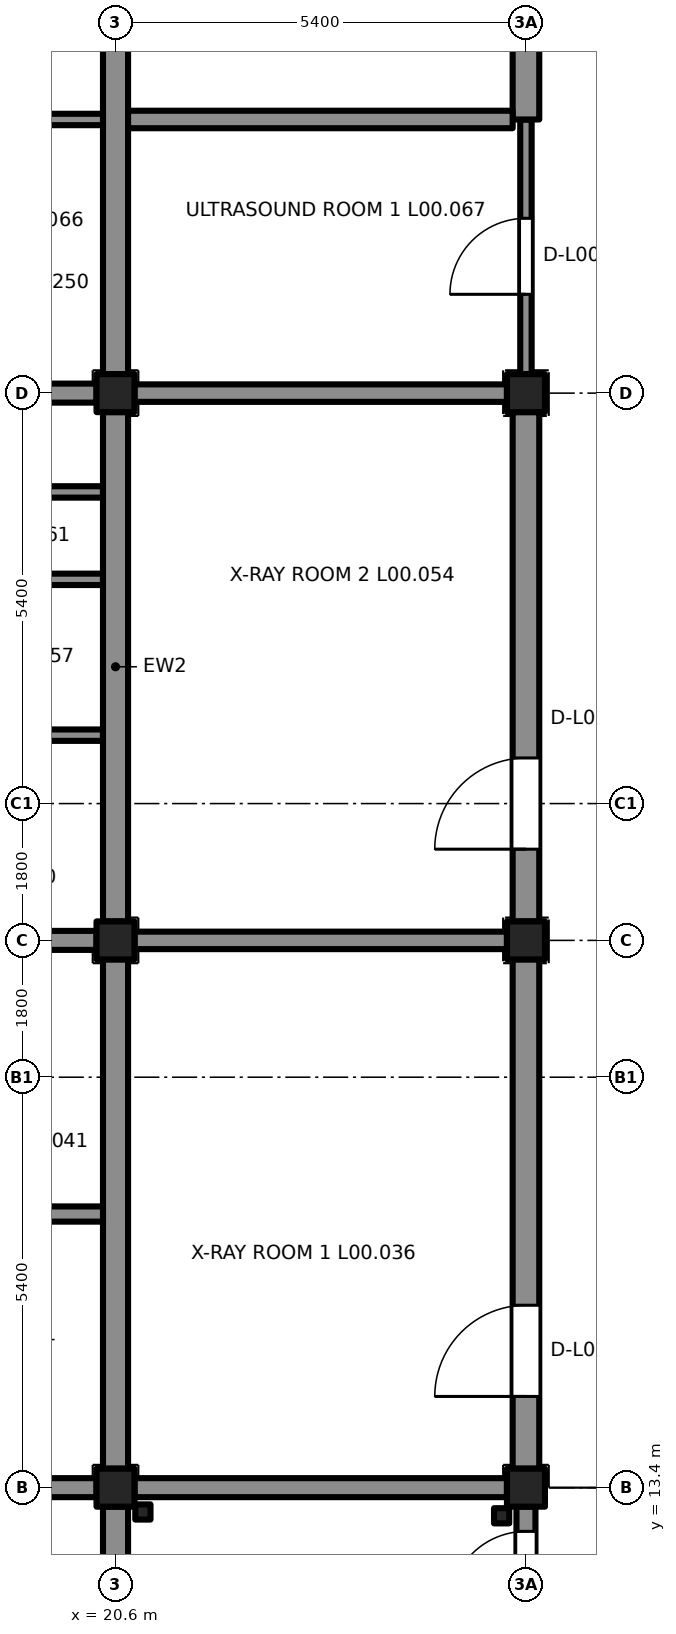
"""IFC4 building model, lengths in metres.
Left out: names, types, materials, properties, quantities, classifications, styles, units other than length and angle.
Written with IfcOpenShell. Run it as: python <this file> out.ifc"""

import sys

from ifc_helpers import new_model, si_unit, direction, frame, frame_2d, origin, origin_2d, place, context, subcontext, project, spatial, rectangle, extrude, element, fill, save


model = new_model("IFC4")
c1 = context("Model", 3, precision=1e-05, world=origin(), true_north=direction((0.0, 1.0)))
c2 = subcontext(c1, "Body", "Model", "MODEL_VIEW")
j1 = project(units=[si_unit("LENGTHUNIT", "METRE"), si_unit("PLANEANGLEUNIT", "RADIAN")], contexts=[c1])
p1 = place(None, origin())
s1 = spatial("IfcSite", under=j1, at=p1, CompositionType="ELEMENT")
p2 = place(p1, origin())
s2 = spatial("IfcBuilding", under=s1, at=p2, CompositionType="ELEMENT")
p3 = place(p2, origin())
s3 = spatial("IfcBuildingStorey", under=s2, at=p3, CompositionType="ELEMENT", Elevation=0.0)
for number, where, z_axis, x_axis in (
    (1, (20.6, 13.4, -0.2), (0.0, 0.0, 1.0), (1.0, 0.0, 0.0)),
    (2, (20.6, 20.6, -0.2), (0.0, 0.0, 1.0), (1.0, 0.0, 0.0)),
    (3, (20.6, 27.8, -0.2), (0.0, 0.0, 1.0), (1.0, 0.0, 0.0)),
    (4, (26.0, 13.4, -0.2), (0.0, 0.0, 1.0), (1.0, 0.0, 0.0)),
    (5, (26.0, 20.6, -0.2), (0.0, 0.0, 1.0), (1.0, 0.0, 0.0)),
    (6, (26.0, 27.8, -0.2), (0.0, 0.0, 1.0), (1.0, 0.0, 0.0)),
):
    element("IfcColumn", number, at=place(p3, frame(where, z_axis=z_axis, x_axis=x_axis)), inside=s3, PredefinedType="COLUMN", context=c2, shape_type="SweptSolid", body=[
        extrude(rectangle(XDim=0.5, YDim=0.5, at=origin_2d()), origin(), (0.0, 0.0, 1.0), 5.45),
    ])
for number, where, z_axis, x_axis in (
    (7, (15.45, 13.4, 0.0), (0.0, 0.0, 1.0), (1.0, 0.0, 0.0)),
    (8, (15.45, 20.6, 0.0), (0.0, 0.0, 1.0), (1.0, 0.0, 0.0)),
    (9, (15.45, 27.8, 0.0), (0.0, 0.0, 1.0), (1.0, 0.0, 0.0)),
):
    element("IfcWall", number, at=place(p3, frame(where, z_axis=z_axis, x_axis=x_axis)), inside=s3, PredefinedType="SHEAR", context=c2, shape_type="SweptSolid", body=[
        extrude(rectangle(XDim=4.9, YDim=0.25, at=frame_2d((2.45, 0.0))), origin(), (0.0, 0.0, 1.0), 6.05),
    ])
for number, where, z_axis, x_axis in (
    (10, (15.325, 23.3, 0.0), (0.0, 0.0, 1.0), (1.0, 0.0, 0.0)),
    (11, (15.325, 25.35, 0.0), (0.0, 0.0, 1.0), (1.0, 0.0, 0.0)),
    (12, (15.325, 26.5, 0.0), (0.0, 0.0, 1.0), (1.0, 0.0, 0.0)),
):
    element("IfcWall", number, at=place(p3, frame(where, z_axis=z_axis, x_axis=x_axis)), inside=s3, PredefinedType="PARTITIONING", context=c2, shape_type="SweptSolid", body=[
        extrude(rectangle(XDim=5.11, YDim=0.15, at=frame_2d((2.555, 0.0))), origin(), (0.0, 0.0, 1.0), 6.05),
    ])
p4 = place(p3, frame((26.0, 6.365, 0.0), z_axis=(0.0, 0.0, 1.0), x_axis=(0.0, 1.0, 0.0)))
e13 = element("IfcWall", 13, at=p4, inside=s3, PredefinedType="SHEAR", context=c2, shape_type="SweptSolid", body=[
    extrude(rectangle(XDim=6.785, YDim=0.25, at=frame_2d((3.393, 0.0))), origin(), (0.0, 0.0, 1.0), 6.05),
])
p5 = place(p4, frame((5.46, 0.0, 0.0)))
e14 = element("IfcOpeningElement", 14, at=p5, cuts=e13, PredefinedType="OPENING", context=c2, shape_type="SweptSolid", body=[
    extrude(rectangle(XDim=1.0, YDim=2.1, at=frame_2d((0.5, 1.05))), frame((0.0, 0.135, 0.0), z_axis=(0.0, -1.0, 0.0), x_axis=(1.0, 0.0, 0.0)), (0.0, 0.0, 1.0), 0.27),
])
p6 = place(p3, frame((20.85, 13.4, 0.0), z_axis=(0.0, 0.0, 1.0), x_axis=(1.0, 0.0, 0.0)))
e15 = element("IfcWall", 15, at=p6, inside=s3, PredefinedType="SHEAR", context=c2, shape_type="SweptSolid", body=[
    extrude(rectangle(XDim=4.9, YDim=0.25, at=frame_2d((2.45, 0.0))), origin(), (0.0, 0.0, 1.0), 6.05),
])
for number, where, z_axis, x_axis in (
    (16, (20.96, 13.08, 0.0), (0.0, 0.0, 1.0), (1.0, 0.0, 0.0)),
    (17, (25.68, 13.03, 0.0), (0.0, 0.0, 1.0), (1.0, 0.0, 0.0)),
):
    element("IfcColumn", number, at=place(p3, frame(where, z_axis=z_axis, x_axis=x_axis)), inside=s3, PredefinedType="COLUMN", context=c2, shape_type="SweptSolid", body=[
        extrude(rectangle(XDim=0.2, YDim=0.2, at=origin_2d()), origin(), (0.0, 0.0, 1.0), 2.95),
    ])
p7 = place(p3, frame((20.6, 13.15, 0.0), z_axis=(0.0, 0.0, 1.0), x_axis=(0.0, -1.0, 0.0)))
e18 = element("IfcWall", 18, at=p7, inside=s3, PredefinedType="SOLIDWALL", context=c2, shape_type="SweptSolid", body=[
    extrude(rectangle(XDim=7.115, YDim=0.33, at=frame_2d((3.558, 0.0))), origin(), (0.0, 0.0, 1.0), 5.25),
])
p8 = place(p3, frame((20.6, 20.35, 0.0), z_axis=(0.0, 0.0, 1.0), x_axis=(0.0, -1.0, 0.0)))
e19 = element("IfcWall", 19, at=p8, inside=s3, PredefinedType="SOLIDWALL", context=c2, shape_type="SweptSolid", body=[
    extrude(rectangle(XDim=6.7, YDim=0.33, at=frame_2d((3.35, 0.0))), origin(), (0.0, 0.0, 1.0), 5.25),
])
for number, where, z_axis, x_axis in (
    (20, (20.6, 27.55, 0.0), (0.0, 0.0, 1.0), (0.0, -1.0, 0.0)),
    (21, (20.6, 34.75, 0.0), (0.0, 0.0, 1.0), (0.0, -1.0, 0.0)),
):
    element("IfcWall", number, at=place(p3, frame(where, z_axis=z_axis, x_axis=x_axis)), inside=s3, PredefinedType="SOLIDWALL", context=c2, shape_type="SweptSolid", body=[
        extrude(rectangle(XDim=6.7, YDim=0.33, at=frame_2d((3.35, 0.0))), origin(), (0.0, 0.0, 1.0), 5.25),
    ])
p9 = place(p3, frame((20.435, 17.0, 0.0), z_axis=(0.0, 0.0, 1.0), x_axis=(-1.0, 0.0, 0.0)))
e22 = element("IfcWall", 22, at=p9, inside=s3, PredefinedType="PARTITIONING", context=c2, shape_type="SweptSolid", body=[
    extrude(rectangle(XDim=5.16, YDim=0.2, at=frame_2d((2.58, 0.0))), origin(), (0.0, 0.0, 1.0), 6.05),
])
p10 = place(p3, frame((20.435, 31.4, 0.0), z_axis=(0.0, 0.0, 1.0), x_axis=(-1.0, 0.0, 0.0)))
e23 = element("IfcWall", 23, at=p10, inside=s3, PredefinedType="PARTITIONING", context=c2, shape_type="SweptSolid", body=[
    extrude(rectangle(XDim=5.16, YDim=0.15, at=frame_2d((2.58, 0.0))), origin(), (0.0, 0.0, 1.0), 6.05),
])
p11 = place(p3, frame((26.0, 13.65, 0.0), z_axis=(0.0, 0.0, 1.0), x_axis=(0.0, 1.0, 0.0)))
e24 = element("IfcWall", 24, at=p11, inside=s3, PredefinedType="SOLIDWALL", context=c2, shape_type="SweptSolid", body=[
    extrude(rectangle(XDim=6.7, YDim=0.35, at=frame_2d((3.35, 0.0))), origin(), (0.0, 0.0, 1.0), 5.25),
])
p12 = place(p11, frame((0.95, 0.0, 0.0)))
e25 = element("IfcOpeningElement", 25, at=p12, cuts=e24, PredefinedType="OPENING", context=c2, shape_type="SweptSolid", body=[
    extrude(rectangle(XDim=1.2, YDim=2.1, at=frame_2d((0.6, 1.05))), frame((0.0, 0.185, 0.0), z_axis=(0.0, -1.0, 0.0), x_axis=(1.0, 0.0, 0.0)), (0.0, 0.0, 1.0), 0.37),
])
p13 = place(p3, frame((26.0, 20.85, 0.0), z_axis=(0.0, 0.0, 1.0), x_axis=(0.0, 1.0, 0.0)))
e26 = element("IfcWall", 26, at=p13, inside=s3, PredefinedType="SOLIDWALL", context=c2, shape_type="SweptSolid", body=[
    extrude(rectangle(XDim=6.7, YDim=0.35, at=frame_2d((3.35, 0.0))), origin(), (0.0, 0.0, 1.0), 5.25),
])
p14 = place(p13, frame((0.95, 0.0, 0.0)))
e27 = element("IfcOpeningElement", 27, at=p14, cuts=e26, PredefinedType="OPENING", context=c2, shape_type="SweptSolid", body=[
    extrude(rectangle(XDim=1.2, YDim=2.1, at=frame_2d((0.6, 1.05))), frame((0.0, 0.185, 0.0), z_axis=(0.0, -1.0, 0.0), x_axis=(1.0, 0.0, 0.0)), (0.0, 0.0, 1.0), 0.37),
])
p15 = place(p3, frame((20.85, 20.6, 0.0), z_axis=(0.0, 0.0, 1.0), x_axis=(1.0, 0.0, 0.0)))
e28 = element("IfcWall", 28, at=p15, inside=s3, PredefinedType="SOLIDWALL", context=c2, shape_type="SweptSolid", body=[
    extrude(rectangle(XDim=4.9, YDim=0.23, at=frame_2d((2.45, 0.0))), origin(), (0.0, 0.0, 1.0), 6.05),
])
p16 = place(p3, frame((26.0, 28.05, 0.0), z_axis=(0.0, 0.0, 1.0), x_axis=(0.0, 1.0, 0.0)))
e29 = element("IfcWall", 29, at=p16, inside=s3, PredefinedType="PARTITIONING", context=c2, shape_type="SweptSolid", body=[
    extrude(rectangle(XDim=3.35, YDim=0.15, at=frame_2d((1.675, 0.0))), origin(), (0.0, 0.0, 1.0), 5.25),
])
p17 = place(p16, frame((1.05, 0.0, 0.0)))
e30 = element("IfcOpeningElement", 30, at=p17, cuts=e29, PredefinedType="OPENING", context=c2, shape_type="SweptSolid", body=[
    extrude(rectangle(XDim=1.0, YDim=2.1, at=frame_2d((0.5, 1.05))), frame((0.0, 0.085, 0.0), z_axis=(0.0, -1.0, 0.0), x_axis=(1.0, 0.0, 0.0)), (0.0, 0.0, 1.0), 0.17),
])
p18 = place(p3, frame((20.85, 27.8, 0.0), z_axis=(0.0, 0.0, 1.0), x_axis=(1.0, 0.0, 0.0)))
e31 = element("IfcWall", 31, at=p18, inside=s3, PredefinedType="SOLIDWALL", context=c2, shape_type="SweptSolid", body=[
    extrude(rectangle(XDim=4.9, YDim=0.23, at=frame_2d((2.45, 0.0))), origin(), (0.0, 0.0, 1.0), 6.05),
])
p19 = place(p3, frame((26.0, 31.4, 0.0), z_axis=(0.0, 0.0, 1.0), x_axis=(0.0, 1.0, 0.0)))
e32 = element("IfcWall", 32, at=p19, inside=s3, PredefinedType="SOLIDWALL", context=c2, shape_type="SweptSolid", body=[
    extrude(rectangle(XDim=3.35, YDim=0.35, at=frame_2d((1.675, 0.0))), origin(), (0.0, 0.0, 1.0), 5.25),
])
p20 = place(p19, frame((1.2, 0.0, 0.0)))
e33 = element("IfcOpeningElement", 33, at=p20, cuts=e32, PredefinedType="OPENING", context=c2, shape_type="SweptSolid", body=[
    extrude(rectangle(XDim=1.2, YDim=2.1, at=frame_2d((0.6, 1.05))), frame((0.0, 0.185, 0.0), z_axis=(0.0, -1.0, 0.0), x_axis=(1.0, 0.0, 0.0)), (0.0, 0.0, 1.0), 0.37),
])
p21 = place(p3, frame((20.765, 31.4, 0.0), z_axis=(0.0, 0.0, 1.0), x_axis=(1.0, 0.0, 0.0)))
e34 = element("IfcWall", 34, at=p21, inside=s3, PredefinedType="SOLIDWALL", context=c2, shape_type="SweptSolid", body=[
    extrude(rectangle(XDim=5.06, YDim=0.23, at=frame_2d((2.53, 0.0))), origin(), (0.0, 0.0, 1.0), 6.05),
])
p22 = place(p5, origin())
e35 = element("IfcDoor", 35, at=p22, inside=s3, OperationType="SINGLE_SWING_RIGHT", PredefinedType="DOOR", context=c2, shape_type="SweptSolid", body=[
    extrude(rectangle(XDim=1.0, YDim=2.1, at=frame_2d((0.5, 1.05))), frame((0.0, 0.025, 0.0), z_axis=(0.0, -1.0, 0.0), x_axis=(1.0, 0.0, 0.0)), (0.0, 0.0, 1.0), 0.05),
])
fill(e14, e35)
p23 = place(p12, origin())
e36 = element("IfcDoor", 36, at=p23, inside=s3, OperationType="SINGLE_SWING_LEFT", PredefinedType="DOOR", context=c2, shape_type="SweptSolid", body=[
    extrude(rectangle(XDim=1.2, YDim=2.1, at=frame_2d((0.6, 1.05))), frame((0.0, 0.025, 0.0), z_axis=(0.0, -1.0, 0.0), x_axis=(1.0, 0.0, 0.0)), (0.0, 0.0, 1.0), 0.05),
])
fill(e25, e36)
p24 = place(p14, origin())
e37 = element("IfcDoor", 37, at=p24, inside=s3, OperationType="SINGLE_SWING_LEFT", PredefinedType="DOOR", context=c2, shape_type="SweptSolid", body=[
    extrude(rectangle(XDim=1.2, YDim=2.1, at=frame_2d((0.6, 1.05))), frame((0.0, 0.025, 0.0), z_axis=(0.0, -1.0, 0.0), x_axis=(1.0, 0.0, 0.0)), (0.0, 0.0, 1.0), 0.05),
])
fill(e27, e37)
p25 = place(p17, origin())
e38 = element("IfcDoor", 38, at=p25, inside=s3, OperationType="SINGLE_SWING_LEFT", PredefinedType="DOOR", context=c2, shape_type="SweptSolid", body=[
    extrude(rectangle(XDim=1.0, YDim=2.1, at=frame_2d((0.5, 1.05))), frame((0.0, 0.025, 0.0), z_axis=(0.0, -1.0, 0.0), x_axis=(1.0, 0.0, 0.0)), (0.0, 0.0, 1.0), 0.05),
])
fill(e30, e38)
save(model, sys.argv[1])
